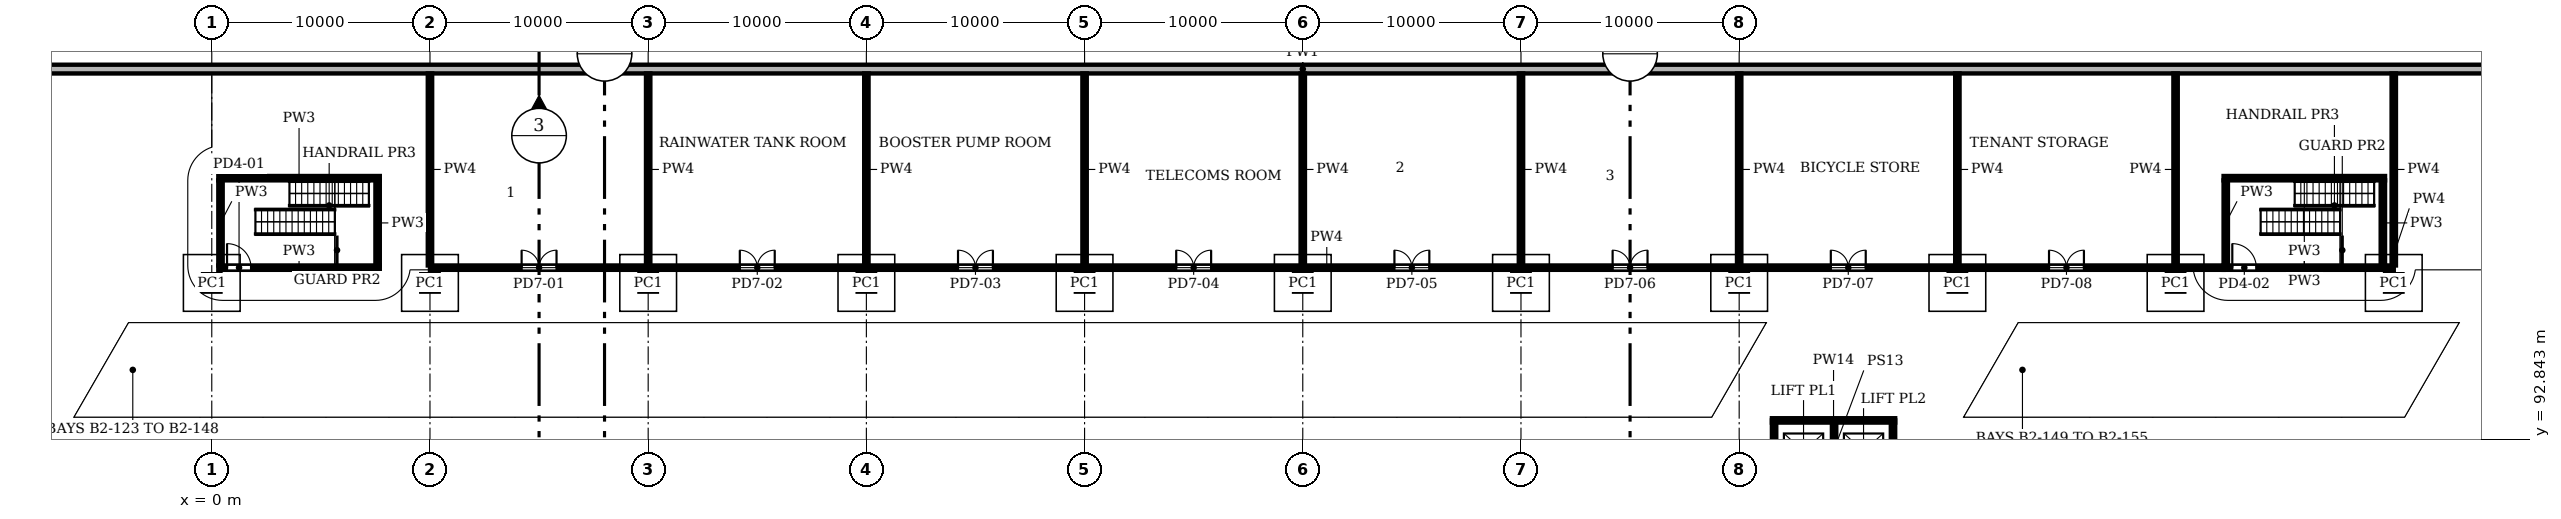
"""IFC4 building model, lengths in metres.
Left out: names, types, materials, properties, quantities, classifications, styles, units other than length and angle.
Written with IfcOpenShell. Run it as: python <this file> out.ifc"""

import sys

from ifc_helpers import new_model, si_unit, direction, frame, frame_2d, origin, origin_2d, place, context, subcontext, project, spatial, rectangle, extrude, element, fill, save


model = new_model("IFC4")
c1 = context("Model", 3, precision=1e-05, world=origin(), true_north=direction((0.0, 1.0)))
c2 = subcontext(c1, "Body", "Model", "MODEL_VIEW")
j1 = project(units=[si_unit("LENGTHUNIT", "METRE"), si_unit("PLANEANGLEUNIT", "RADIAN")], contexts=[c1])
p1 = place(None, origin())
s1 = spatial("IfcSite", under=j1, at=p1, CompositionType="ELEMENT")
p2 = place(p1, origin())
s2 = spatial("IfcBuilding", under=s1, at=p2, CompositionType="ELEMENT")
p3 = place(p2, frame((0.0, 0.0, -9.0)))
s3 = spatial("IfcBuildingStorey", under=s2, at=p3, CompositionType="ELEMENT", Elevation=-9.0)
for number, where, z_axis, x_axis in (
    (1, (0.0, 100.0, 0.0), (0.0, 0.0, 1.0), (1.0, 0.0, 0.0)),
    (2, (10.0, 100.0, 0.0), (0.0, 0.0, 1.0), (1.0, 0.0, 0.0)),
    (3, (20.0, 100.0, 0.0), (0.0, 0.0, 1.0), (1.0, 0.0, 0.0)),
    (4, (30.0, 100.0, 0.0), (0.0, 0.0, 1.0), (1.0, 0.0, 0.0)),
    (5, (40.0, 100.0, 0.0), (0.0, 0.0, 1.0), (1.0, 0.0, 0.0)),
    (6, (50.0, 100.0, 0.0), (0.0, 0.0, 1.0), (1.0, 0.0, 0.0)),
    (7, (60.0, 100.0, 0.0), (0.0, 0.0, 1.0), (1.0, 0.0, 0.0)),
    (8, (70.0, 100.0, 0.0), (0.0, 0.0, 1.0), (1.0, 0.0, 0.0)),
    (9, (80.0, 100.0, 0.0), (0.0, 0.0, 1.0), (1.0, 0.0, 0.0)),
    (10, (90.0, 100.0, 0.0), (0.0, 0.0, 1.0), (1.0, 0.0, 0.0)),
    (11, (100.0, 100.0, 0.0), (0.0, 0.0, 1.0), (1.0, 0.0, 0.0)),
):
    element("IfcColumn", number, at=place(p3, frame(where, z_axis=z_axis, x_axis=x_axis)), inside=s3, PredefinedType="COLUMN", context=c2, shape_type="SweptSolid", body=[
        extrude(rectangle(XDim=0.8, YDim=0.8, at=origin_2d()), origin(), (0.0, 0.0, 1.0), 4.5),
    ])
p4 = place(p3, frame((110.0, 109.8, 0.0), z_axis=(0.0, 0.0, 1.0), x_axis=(-1.0, 0.0, 0.0)))
e12 = element("IfcWall", 12, at=p4, inside=s3, PredefinedType="SOLIDWALL", context=c2, shape_type="SweptSolid", body=[
    extrude(rectangle(XDim=120.0, YDim=0.4, at=frame_2d((60.0, 0.0))), origin(), (0.0, 0.0, 1.0), 4.5),
])
p5 = place(p3, frame((10.0, 100.7, 0.0), z_axis=(0.0, 0.0, 1.0), x_axis=(1.0, 0.0, 0.0)))
e13 = element("IfcWall", 13, at=p5, inside=s3, PredefinedType="PARTITIONING", context=c2, shape_type="SweptSolid", body=[
    extrude(rectangle(XDim=82.2, YDim=0.2, at=frame_2d((41.1, 0.0))), origin(), (0.0, 0.0, 1.0), 4.1),
])
p6 = place(p5, frame((4.2, 0.0, 0.0)))
e14 = element("IfcOpeningElement", 14, at=p6, cuts=e13, PredefinedType="OPENING", context=c2, shape_type="SweptSolid", body=[
    extrude(rectangle(XDim=1.6, YDim=2.1, at=frame_2d((0.8, 1.05))), frame((0.0, 0.11, 0.0), z_axis=(0.0, -1.0, 0.0), x_axis=(1.0, 0.0, 0.0)), (0.0, 0.0, 1.0), 0.22),
])
p7 = place(p5, frame((14.2, 0.0, 0.0)))
e15 = element("IfcOpeningElement", 15, at=p7, cuts=e13, PredefinedType="OPENING", context=c2, shape_type="SweptSolid", body=[
    extrude(rectangle(XDim=1.6, YDim=2.1, at=frame_2d((0.8, 1.05))), frame((0.0, 0.11, 0.0), z_axis=(0.0, -1.0, 0.0), x_axis=(1.0, 0.0, 0.0)), (0.0, 0.0, 1.0), 0.22),
])
p8 = place(p5, frame((24.2, 0.0, 0.0)))
e16 = element("IfcOpeningElement", 16, at=p8, cuts=e13, PredefinedType="OPENING", context=c2, shape_type="SweptSolid", body=[
    extrude(rectangle(XDim=1.6, YDim=2.1, at=frame_2d((0.8, 1.05))), frame((0.0, 0.11, 0.0), z_axis=(0.0, -1.0, 0.0), x_axis=(1.0, 0.0, 0.0)), (0.0, 0.0, 1.0), 0.22),
])
p9 = place(p5, frame((34.2, 0.0, 0.0)))
e17 = element("IfcOpeningElement", 17, at=p9, cuts=e13, PredefinedType="OPENING", context=c2, shape_type="SweptSolid", body=[
    extrude(rectangle(XDim=1.6, YDim=2.1, at=frame_2d((0.8, 1.05))), frame((0.0, 0.11, 0.0), z_axis=(0.0, -1.0, 0.0), x_axis=(1.0, 0.0, 0.0)), (0.0, 0.0, 1.0), 0.22),
])
p10 = place(p5, frame((44.2, 0.0, 0.0)))
e18 = element("IfcOpeningElement", 18, at=p10, cuts=e13, PredefinedType="OPENING", context=c2, shape_type="SweptSolid", body=[
    extrude(rectangle(XDim=1.6, YDim=2.1, at=frame_2d((0.8, 1.05))), frame((0.0, 0.11, 0.0), z_axis=(0.0, -1.0, 0.0), x_axis=(1.0, 0.0, 0.0)), (0.0, 0.0, 1.0), 0.22),
])
p11 = place(p5, frame((54.2, 0.0, 0.0)))
e19 = element("IfcOpeningElement", 19, at=p11, cuts=e13, PredefinedType="OPENING", context=c2, shape_type="SweptSolid", body=[
    extrude(rectangle(XDim=1.6, YDim=2.1, at=frame_2d((0.8, 1.05))), frame((0.0, 0.11, 0.0), z_axis=(0.0, -1.0, 0.0), x_axis=(1.0, 0.0, 0.0)), (0.0, 0.0, 1.0), 0.22),
])
p12 = place(p5, frame((64.2, 0.0, 0.0)))
e20 = element("IfcOpeningElement", 20, at=p12, cuts=e13, PredefinedType="OPENING", context=c2, shape_type="SweptSolid", body=[
    extrude(rectangle(XDim=1.6, YDim=2.1, at=frame_2d((0.8, 1.05))), frame((0.0, 0.11, 0.0), z_axis=(0.0, -1.0, 0.0), x_axis=(1.0, 0.0, 0.0)), (0.0, 0.0, 1.0), 0.22),
])
p13 = place(p5, frame((74.2, 0.0, 0.0)))
e21 = element("IfcOpeningElement", 21, at=p13, cuts=e13, PredefinedType="OPENING", context=c2, shape_type="SweptSolid", body=[
    extrude(rectangle(XDim=1.6, YDim=2.1, at=frame_2d((0.8, 1.05))), frame((0.0, 0.11, 0.0), z_axis=(0.0, -1.0, 0.0), x_axis=(1.0, 0.0, 0.0)), (0.0, 0.0, 1.0), 0.22),
])
p14 = place(p3, frame((99.6, 100.7, 0.0), z_axis=(0.0, 0.0, 1.0), x_axis=(1.0, 0.0, 0.0)))
e22 = element("IfcWall", 22, at=p14, inside=s3, PredefinedType="PARTITIONING", context=c2, shape_type="SweptSolid", body=[
    extrude(rectangle(XDim=0.4, YDim=0.2, at=frame_2d((0.2, 0.0))), origin(), (0.0, 0.0, 1.0), 4.1),
])
for number, where, z_axis, x_axis in (
    (23, (10.0, 100.8, 0.0), (0.0, 0.0, 1.0), (0.0, 1.0, 0.0)),
    (24, (20.0, 100.8, 0.0), (0.0, 0.0, 1.0), (0.0, 1.0, 0.0)),
    (25, (30.0, 100.8, 0.0), (0.0, 0.0, 1.0), (0.0, 1.0, 0.0)),
    (26, (40.0, 100.8, 0.0), (0.0, 0.0, 1.0), (0.0, 1.0, 0.0)),
    (27, (50.0, 100.8, 0.0), (0.0, 0.0, 1.0), (0.0, 1.0, 0.0)),
    (28, (60.0, 100.8, 0.0), (0.0, 0.0, 1.0), (0.0, 1.0, 0.0)),
    (29, (70.0, 100.8, 0.0), (0.0, 0.0, 1.0), (0.0, 1.0, 0.0)),
    (30, (80.0, 100.8, 0.0), (0.0, 0.0, 1.0), (0.0, 1.0, 0.0)),
    (31, (90.0, 100.8, 0.0), (0.0, 0.0, 1.0), (0.0, 1.0, 0.0)),
    (32, (100.0, 100.8, 0.0), (0.0, 0.0, 1.0), (0.0, 1.0, 0.0)),
):
    element("IfcWall", number, at=place(p3, frame(where, z_axis=z_axis, x_axis=x_axis)), inside=s3, PredefinedType="PARTITIONING", context=c2, shape_type="SweptSolid", body=[
        extrude(rectangle(XDim=8.8, YDim=0.2, at=frame_2d((4.4, 0.0))), origin(), (0.0, 0.0, 1.0), 4.1),
    ])
p15 = place(p3, frame((0.3, 100.7, 0.0), z_axis=(0.0, 0.0, 1.0), x_axis=(1.0, 0.0, 0.0)))
e33 = element("IfcWall", 33, at=p15, inside=s3, PredefinedType="SOLIDWALL", context=c2, shape_type="SweptSolid", body=[
    extrude(rectangle(XDim=7.4, YDim=0.2, at=frame_2d((3.7, 0.0))), origin(), (0.0, 0.0, 1.0), 4.1),
])
p16 = place(p15, frame((0.4, 0.0, 0.0)))
e34 = element("IfcOpeningElement", 34, at=p16, cuts=e33, PredefinedType="OPENING", context=c2, shape_type="SweptSolid", body=[
    extrude(rectangle(XDim=1.1, YDim=2.1, at=frame_2d((0.55, 1.05))), frame((0.0, 0.11, 0.0), z_axis=(0.0, -1.0, 0.0), x_axis=(1.0, 0.0, 0.0)), (0.0, 0.0, 1.0), 0.22),
])
p17 = place(p3, frame((0.3, 104.8, 0.0), z_axis=(0.0, 0.0, 1.0), x_axis=(1.0, 0.0, 0.0)))
e35 = element("IfcWall", 35, at=p17, inside=s3, PredefinedType="SOLIDWALL", context=c2, shape_type="SweptSolid", body=[
    extrude(rectangle(XDim=7.4, YDim=0.2, at=frame_2d((3.7, 0.0))), origin(), (0.0, 0.0, 1.0), 4.1),
])
for number, where, z_axis, x_axis in (
    (36, (0.4, 100.8, 0.0), (0.0, 0.0, 1.0), (0.0, 1.0, 0.0)),
    (37, (7.6, 100.8, 0.0), (0.0, 0.0, 1.0), (0.0, 1.0, 0.0)),
):
    element("IfcWall", number, at=place(p3, frame(where, z_axis=z_axis, x_axis=x_axis)), inside=s3, PredefinedType="SOLIDWALL", context=c2, shape_type="SweptSolid", body=[
        extrude(rectangle(XDim=3.9, YDim=0.2, at=frame_2d((1.95, 0.0))), origin(), (0.0, 0.0, 1.0), 4.1),
    ])
p18 = place(p3, frame((92.2, 100.7, 0.0), z_axis=(0.0, 0.0, 1.0), x_axis=(1.0, 0.0, 0.0)))
e38 = element("IfcWall", 38, at=p18, inside=s3, PredefinedType="SOLIDWALL", context=c2, shape_type="SweptSolid", body=[
    extrude(rectangle(XDim=7.4, YDim=0.2, at=frame_2d((3.7, 0.0))), origin(), (0.0, 0.0, 1.0), 4.1),
])
p19 = place(p18, frame((0.4, 0.0, 0.0)))
e39 = element("IfcOpeningElement", 39, at=p19, cuts=e38, PredefinedType="OPENING", context=c2, shape_type="SweptSolid", body=[
    extrude(rectangle(XDim=1.1, YDim=2.1, at=frame_2d((0.55, 1.05))), frame((0.0, 0.11, 0.0), z_axis=(0.0, -1.0, 0.0), x_axis=(1.0, 0.0, 0.0)), (0.0, 0.0, 1.0), 0.22),
])
p20 = place(p3, frame((92.2, 104.8, 0.0), z_axis=(0.0, 0.0, 1.0), x_axis=(1.0, 0.0, 0.0)))
e40 = element("IfcWall", 40, at=p20, inside=s3, PredefinedType="SOLIDWALL", context=c2, shape_type="SweptSolid", body=[
    extrude(rectangle(XDim=7.4, YDim=0.2, at=frame_2d((3.7, 0.0))), origin(), (0.0, 0.0, 1.0), 4.1),
])
for number, where, z_axis, x_axis in (
    (41, (92.3, 100.8, 0.0), (0.0, 0.0, 1.0), (0.0, 1.0, 0.0)),
    (42, (99.5, 100.8, 0.0), (0.0, 0.0, 1.0), (0.0, 1.0, 0.0)),
):
    element("IfcWall", number, at=place(p3, frame(where, z_axis=z_axis, x_axis=x_axis)), inside=s3, PredefinedType="SOLIDWALL", context=c2, shape_type="SweptSolid", body=[
        extrude(rectangle(XDim=3.9, YDim=0.2, at=frame_2d((1.95, 0.0))), origin(), (0.0, 0.0, 1.0), 4.1),
    ])
p21 = place(p3, frame((71.5, 93.7, -1.0), z_axis=(0.0, 0.0, 1.0), x_axis=(1.0, 0.0, 0.0)))
e43 = element("IfcWall", 43, at=p21, inside=s3, PredefinedType="SOLIDWALL", context=c2, shape_type="SweptSolid", body=[
    extrude(rectangle(XDim=5.65, YDim=0.2, at=frame_2d((2.825, 0.0))), origin(), (0.0, 0.0, 1.0), 5.1),
])
for number, where, z_axis, x_axis in (
    (44, (71.6, 90.9, -1.0), (0.0, 0.0, 1.0), (0.0, 1.0, 0.0)),
    (45, (74.35, 90.9, -1.0), (0.0, 0.0, 1.0), (0.0, 1.0, 0.0)),
    (46, (77.05, 90.9, -1.0), (0.0, 0.0, 1.0), (0.0, 1.0, 0.0)),
):
    element("IfcWall", number, at=place(p3, frame(where, z_axis=z_axis, x_axis=x_axis)), inside=s3, PredefinedType="SOLIDWALL", context=c2, shape_type="SweptSolid", body=[
        extrude(rectangle(XDim=2.8, YDim=0.2, at=frame_2d((1.4, 0.0))), origin(), (0.0, 0.0, 1.0), 5.1),
    ])
p22 = place(p6, origin())
e47 = element("IfcDoor", 47, at=p22, inside=s3, OperationType="DOUBLE_DOOR_SINGLE_SWING", PredefinedType="DOOR", context=c2, shape_type="SweptSolid", body=[
    extrude(rectangle(XDim=1.6, YDim=2.1, at=frame_2d((0.8, 1.05))), frame((0.0, 0.025, 0.0), z_axis=(0.0, -1.0, 0.0), x_axis=(1.0, 0.0, 0.0)), (0.0, 0.0, 1.0), 0.05),
])
fill(e14, e47)
p23 = place(p7, origin())
e48 = element("IfcDoor", 48, at=p23, inside=s3, OperationType="DOUBLE_DOOR_SINGLE_SWING", PredefinedType="DOOR", context=c2, shape_type="SweptSolid", body=[
    extrude(rectangle(XDim=1.6, YDim=2.1, at=frame_2d((0.8, 1.05))), frame((0.0, 0.025, 0.0), z_axis=(0.0, -1.0, 0.0), x_axis=(1.0, 0.0, 0.0)), (0.0, 0.0, 1.0), 0.05),
])
fill(e15, e48)
p24 = place(p8, origin())
e49 = element("IfcDoor", 49, at=p24, inside=s3, OperationType="DOUBLE_DOOR_SINGLE_SWING", PredefinedType="DOOR", context=c2, shape_type="SweptSolid", body=[
    extrude(rectangle(XDim=1.6, YDim=2.1, at=frame_2d((0.8, 1.05))), frame((0.0, 0.025, 0.0), z_axis=(0.0, -1.0, 0.0), x_axis=(1.0, 0.0, 0.0)), (0.0, 0.0, 1.0), 0.05),
])
fill(e16, e49)
p25 = place(p9, origin())
e50 = element("IfcDoor", 50, at=p25, inside=s3, OperationType="DOUBLE_DOOR_SINGLE_SWING", PredefinedType="DOOR", context=c2, shape_type="SweptSolid", body=[
    extrude(rectangle(XDim=1.6, YDim=2.1, at=frame_2d((0.8, 1.05))), frame((0.0, 0.025, 0.0), z_axis=(0.0, -1.0, 0.0), x_axis=(1.0, 0.0, 0.0)), (0.0, 0.0, 1.0), 0.05),
])
fill(e17, e50)
p26 = place(p10, origin())
e51 = element("IfcDoor", 51, at=p26, inside=s3, OperationType="DOUBLE_DOOR_SINGLE_SWING", PredefinedType="DOOR", context=c2, shape_type="SweptSolid", body=[
    extrude(rectangle(XDim=1.6, YDim=2.1, at=frame_2d((0.8, 1.05))), frame((0.0, 0.025, 0.0), z_axis=(0.0, -1.0, 0.0), x_axis=(1.0, 0.0, 0.0)), (0.0, 0.0, 1.0), 0.05),
])
fill(e18, e51)
p27 = place(p11, origin())
e52 = element("IfcDoor", 52, at=p27, inside=s3, OperationType="DOUBLE_DOOR_SINGLE_SWING", PredefinedType="DOOR", context=c2, shape_type="SweptSolid", body=[
    extrude(rectangle(XDim=1.6, YDim=2.1, at=frame_2d((0.8, 1.05))), frame((0.0, 0.025, 0.0), z_axis=(0.0, -1.0, 0.0), x_axis=(1.0, 0.0, 0.0)), (0.0, 0.0, 1.0), 0.05),
])
fill(e19, e52)
p28 = place(p12, origin())
e53 = element("IfcDoor", 53, at=p28, inside=s3, OperationType="DOUBLE_DOOR_SINGLE_SWING", PredefinedType="DOOR", context=c2, shape_type="SweptSolid", body=[
    extrude(rectangle(XDim=1.6, YDim=2.1, at=frame_2d((0.8, 1.05))), frame((0.0, 0.025, 0.0), z_axis=(0.0, -1.0, 0.0), x_axis=(1.0, 0.0, 0.0)), (0.0, 0.0, 1.0), 0.05),
])
fill(e20, e53)
p29 = place(p13, origin())
e54 = element("IfcDoor", 54, at=p29, inside=s3, OperationType="DOUBLE_DOOR_SINGLE_SWING", PredefinedType="DOOR", context=c2, shape_type="SweptSolid", body=[
    extrude(rectangle(XDim=1.6, YDim=2.1, at=frame_2d((0.8, 1.05))), frame((0.0, 0.025, 0.0), z_axis=(0.0, -1.0, 0.0), x_axis=(1.0, 0.0, 0.0)), (0.0, 0.0, 1.0), 0.05),
])
fill(e21, e54)
p30 = place(p16, origin())
e55 = element("IfcDoor", 55, at=p30, inside=s3, OperationType="SINGLE_SWING_LEFT", PredefinedType="DOOR", context=c2, shape_type="SweptSolid", body=[
    extrude(rectangle(XDim=1.1, YDim=2.1, at=frame_2d((0.55, 1.05))), frame((0.0, 0.025, 0.0), z_axis=(0.0, -1.0, 0.0), x_axis=(1.0, 0.0, 0.0)), (0.0, 0.0, 1.0), 0.05),
])
fill(e34, e55)
p31 = place(p19, origin())
e56 = element("IfcDoor", 56, at=p31, inside=s3, OperationType="SINGLE_SWING_LEFT", PredefinedType="DOOR", context=c2, shape_type="SweptSolid", body=[
    extrude(rectangle(XDim=1.1, YDim=2.1, at=frame_2d((0.55, 1.05))), frame((0.0, 0.025, 0.0), z_axis=(0.0, -1.0, 0.0), x_axis=(1.0, 0.0, 0.0)), (0.0, 0.0, 1.0), 0.05),
])
fill(e39, e56)
save(model, sys.argv[1])
